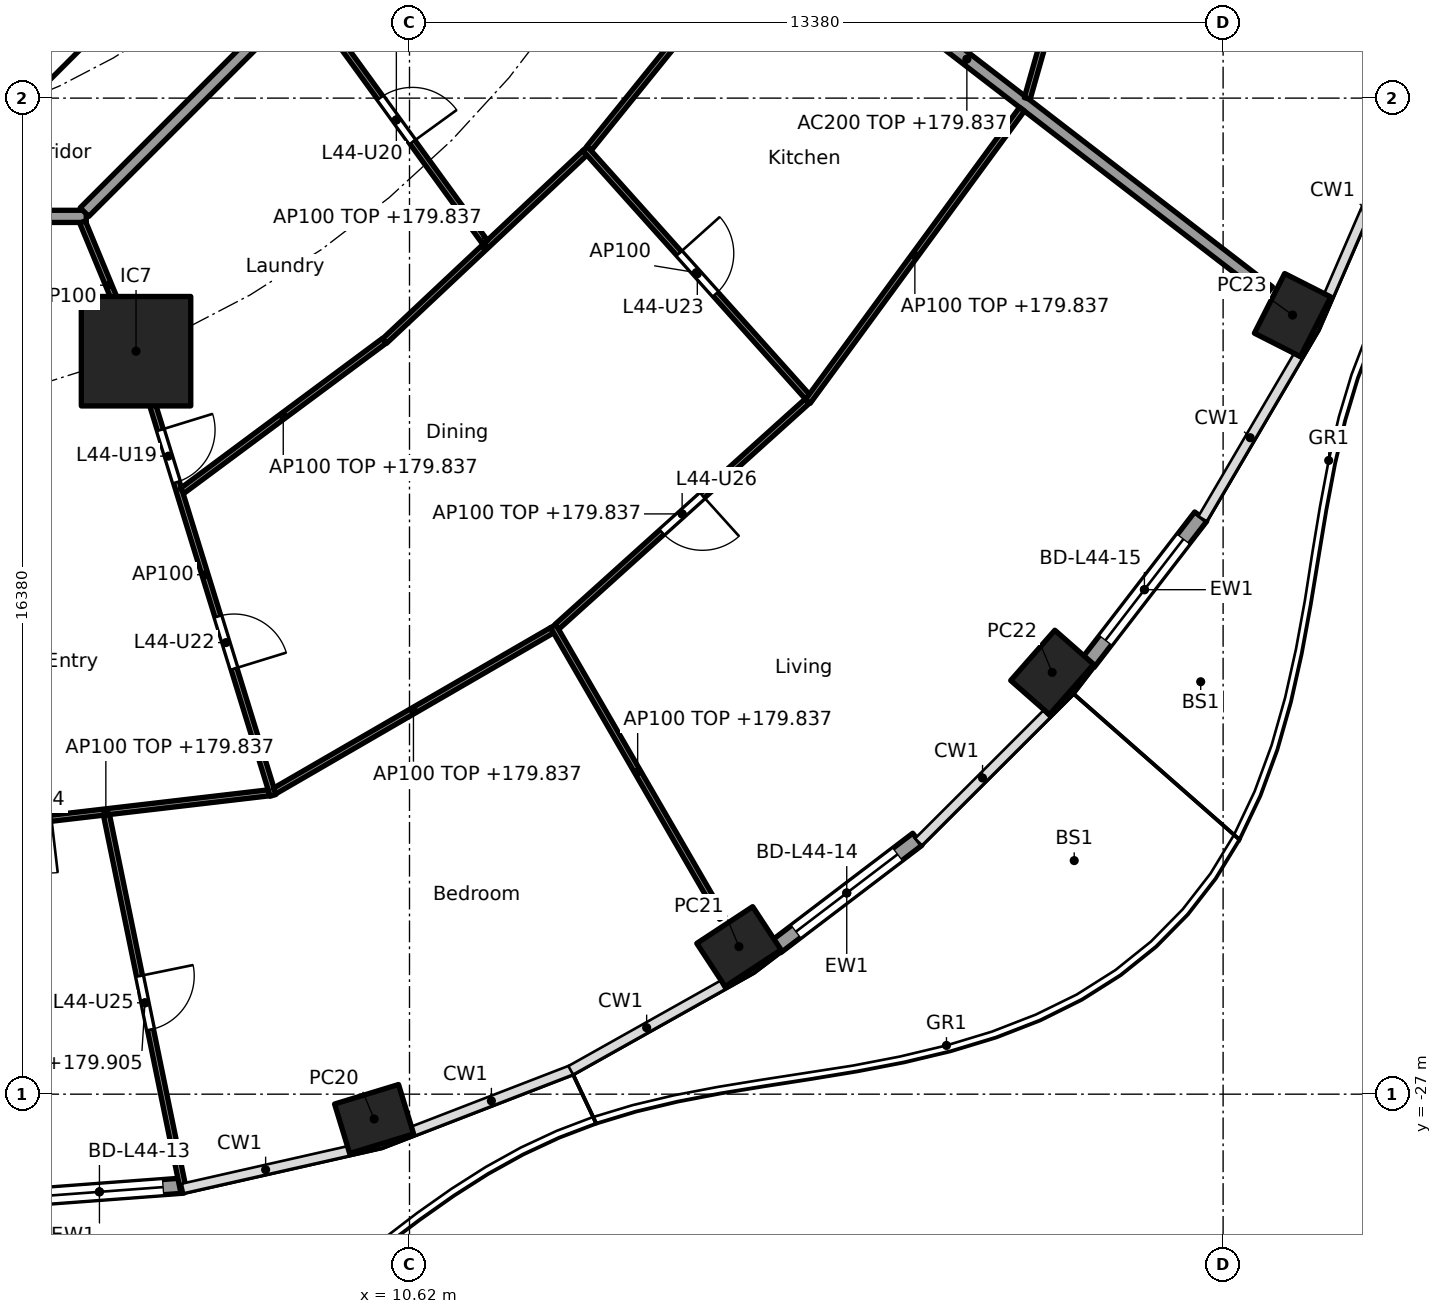
"""IFC4 building model, lengths in metres.
Left out: names, types, materials, properties, quantities, classifications, styles, units other than length and angle.
Written with IfcOpenShell. Run it as: python <this file> out.ifc"""

import sys

from ifc_helpers import new_model, si_unit, direction, frame, frame_2d, origin, origin_2d, place, context, subcontext, project, spatial, polyline, rectangle, hollow_rectangle, outline, extrude, element, fill, save


model = new_model("IFC4")
c1 = context("Model", 3, precision=1e-05, world=origin(), true_north=direction((0.0, 1.0)))
c2 = subcontext(c1, "Body", "Model", "MODEL_VIEW")
j1 = project(units=[si_unit("LENGTHUNIT", "METRE"), si_unit("PLANEANGLEUNIT", "RADIAN")], contexts=[c1])
p1 = place(None, origin())
s1 = spatial("IfcSite", under=j1, at=p1, CompositionType="ELEMENT")
p2 = place(p1, origin())
s2 = spatial("IfcBuilding", under=s1, at=p2, CompositionType="ELEMENT")
p3 = place(p2, frame((0.0, 0.0, 177.0)))
s3 = spatial("IfcBuildingStorey", under=s2, at=p3, CompositionType="ELEMENT", Elevation=177.0)
for number, where, z_axis, x_axis in (
    (1, (10.038, -27.408, 0.0), (0.0, 0.0, 1.0), (0.957, 0.292, 0.0)),
    (2, (16.038, -24.573, 0.0), (0.0, 0.0, 1.0), (0.836, 0.549, 0.0)),
    (3, (21.189, -20.064, 0.0), (0.0, 0.0, 1.0), (0.66, 0.751, 0.0)),
    (4, (25.142, -14.188, 0.0), (0.0, 0.0, 1.0), (0.452, 0.892, 0.0)),
):
    element("IfcColumn", number, at=place(p3, frame(where, z_axis=z_axis, x_axis=x_axis)), inside=s3, PredefinedType="COLUMN", context=c2, shape_type="SweptSolid", body=[
        extrude(hollow_rectangle(XDim=1.1, YDim=0.85, WallThickness=0.036, at=origin_2d()), origin(), (0.0, 0.0, 1.0), 3.7),
    ])
p4 = place(p3, frame((6.123, -14.782, 0.0), z_axis=(0.0, 0.0, 1.0), x_axis=(1.0, 0.0, 0.0)))
e5 = element("IfcColumn", 5, at=p4, inside=s3, PredefinedType="COLUMN", context=c2, shape_type="SweptSolid", body=[
    extrude(rectangle(XDim=1.8, YDim=1.8, at=origin_2d()), origin(), (0.0, 0.0, 1.0), 3.7),
])
p5 = place(p3, frame((6.903, -28.503, 0.0), z_axis=(0.0, 0.0, 1.0), x_axis=(-0.997232064422, -0.074351931305, 0.0)))
e6 = element("IfcWall", 6, at=p5, inside=s3, PredefinedType="SOLIDWALL", context=c2, shape_type="SweptSolid", body=[
    extrude(rectangle(XDim=2.771, YDim=0.25, at=frame_2d((1.386, 0.0))), origin(), (0.0, 0.0, 1.0), 3.44),
])
p6 = place(p5, frame((0.336, 0.0, 0.0)))
e7 = element("IfcOpeningElement", 7, at=p6, cuts=e6, PredefinedType="OPENING", context=c2, shape_type="SweptSolid", body=[
    extrude(rectangle(XDim=2.1, YDim=2.4, at=frame_2d((1.05, 1.2))), frame((0.0, 0.135, 0.0), z_axis=(0.0, -1.0, 0.0), x_axis=(1.0, 0.0, 0.0)), (0.0, 0.0, 1.0), 0.27),
])
p7 = place(p3, frame((18.972, -22.809, 0.0), z_axis=(0.0, 0.0, 1.0), x_axis=(-0.796055733703, -0.60522332146, 0.0)))
e8 = element("IfcWall", 8, at=p7, inside=s3, PredefinedType="SOLIDWALL", context=c2, shape_type="SweptSolid", body=[
    extrude(rectangle(XDim=2.917, YDim=0.25, at=frame_2d((1.458, 0.0))), origin(), (0.0, 0.0, 1.0), 3.44),
])
p8 = place(p7, frame((0.408, 0.0, 0.0)))
e9 = element("IfcOpeningElement", 9, at=p8, cuts=e8, PredefinedType="OPENING", context=c2, shape_type="SweptSolid", body=[
    extrude(rectangle(XDim=2.1, YDim=2.4, at=frame_2d((1.05, 1.2))), frame((0.0, 0.135, 0.0), z_axis=(0.0, -1.0, 0.0), x_axis=(1.0, 0.0, 0.0)), (0.0, 0.0, 1.0), 0.27),
])
p9 = place(p3, frame((23.632, -17.502, 0.0), z_axis=(0.0, 0.0, 1.0), x_axis=(-0.610437428894, -0.79206448311, 0.0)))
e10 = element("IfcWall", 10, at=p9, inside=s3, PredefinedType="SOLIDWALL", context=c2, shape_type="SweptSolid", body=[
    extrude(rectangle(XDim=3.035, YDim=0.25, at=frame_2d((1.518, 0.0))), origin(), (0.0, 0.0, 1.0), 3.44),
])
p10 = place(p9, frame((0.468, 0.0, 0.0)))
e11 = element("IfcOpeningElement", 11, at=p10, cuts=e10, PredefinedType="OPENING", context=c2, shape_type="SweptSolid", body=[
    extrude(rectangle(XDim=2.1, YDim=2.4, at=frame_2d((1.05, 1.2))), frame((0.0, 0.135, 0.0), z_axis=(0.0, -1.0, 0.0), x_axis=(1.0, 0.0, 0.0)), (0.0, 0.0, 1.0), 0.27),
])
p11 = place(p3, frame((4.613, -9.988, 0.0), z_axis=(0.0, 0.0, 1.0), x_axis=(0.707106781187, 0.707106781187, 0.0)))
e12 = element("IfcWall", 12, at=p11, inside=s3, PredefinedType="SHEAR", context=c2, shape_type="SweptSolid", body=[
    extrude(rectangle(XDim=7.602, YDim=0.6, at=frame_2d((3.801, 0.0))), origin(), (0.0, 0.0, 1.0), 3.44),
])
p12 = place(p11, frame((3.201, 0.0, 0.0)))
e13 = element("IfcOpeningElement", 13, at=p12, cuts=e12, PredefinedType="OPENING", context=c2, shape_type="SweptSolid", body=[
    extrude(rectangle(XDim=1.2, YDim=2.1, at=frame_2d((0.6, 1.05))), frame((0.0, 0.31, 0.0), z_axis=(0.0, -1.0, 0.0), x_axis=(1.0, 0.0, 0.0)), (0.0, 0.0, 1.0), 0.62),
])
p13 = place(p3, origin())
e14 = element("IfcWall", 14, at=p13, inside=s3, PredefinedType="SHEAR", context=c2, shape_type="SweptSolid", body=[
    extrude(outline(polyline([(-4.152, -10.025), (4.152, -10.025), (4.401, -9.776), (4.825, -10.2), (4.401, -10.625), (-4.401, -10.625), (-4.825, -10.2), (-4.401, -9.776), (-4.152, -10.025)])), origin(), (0.0, 0.0, 1.0), 3.44),
])
p14 = place(p3, frame((14.822, -6.154, 0.0), z_axis=(0.0, 0.0, 1.0), x_axis=(0.792203056092, -0.610257583254, 0.0)))
e15 = element("IfcWall", 15, at=p14, inside=s3, PredefinedType="PARTITIONING", context=c2, shape_type="SweptSolid", body=[
    extrude(rectangle(XDim=12.533, YDim=0.2, at=frame_2d((6.266, 0.0))), origin(), (0.0, 0.0, 1.0), 2.837),
])
p15 = place(p3, frame((-5.104, -12.565, 0.0), z_axis=(0.0, 0.0, 1.0), x_axis=(1.0, 0.0, 0.0)))
e16 = element("IfcWall", 16, at=p15, inside=s3, PredefinedType="PARTITIONING", context=c2, shape_type="SweptSolid", body=[
    extrude(rectangle(XDim=10.409, YDim=0.2, at=frame_2d((5.205, 0.0))), origin(), (0.0, 0.0, 1.0), 3.44),
])
p16 = place(p15, frame((8.074, 0.0, 0.0)))
e17 = element("IfcOpeningElement", 17, at=p16, cuts=e16, PredefinedType="OPENING", context=c2, shape_type="SweptSolid", body=[
    extrude(rectangle(XDim=1.0, YDim=2.1, at=frame_2d((0.5, 1.05))), frame((0.0, 0.11, 0.0), z_axis=(0.0, -1.0, 0.0), x_axis=(1.0, 0.0, 0.0)), (0.0, 0.0, 1.0), 0.22),
])
p17 = place(p3, frame((5.275, -12.494, 0.0), z_axis=(0.0, 0.0, 1.0), x_axis=(0.707106781187, 0.707106781187, 0.0)))
e18 = element("IfcWall", 18, at=p17, inside=s3, PredefinedType="PARTITIONING", context=c2, shape_type="SweptSolid", body=[
    extrude(rectangle(XDim=10.409, YDim=0.2, at=frame_2d((5.205, 0.0))), origin(), (0.0, 0.0, 1.0), 3.44),
])
p18 = place(p3, frame((2.941, -22.671, 0.0), z_axis=(0.0, 0.0, 1.0), x_axis=(0.993245806382, 0.1160291692, 0.0)))
e19 = element("IfcWall", 19, at=p18, inside=s3, PredefinedType="PARTITIONING", context=c2, shape_type="SweptSolid", body=[
    extrude(rectangle(XDim=5.408, YDim=0.1, at=frame_2d((2.704, 0.0))), origin(), (0.0, 0.0, 1.0), 2.837),
])
p19 = place(p18, frame((0.902, 0.0, 0.0)))
e20 = element("IfcOpeningElement", 20, at=p19, cuts=e19, PredefinedType="OPENING", context=c2, shape_type="SweptSolid", body=[
    extrude(rectangle(XDim=0.9, YDim=2.1, at=frame_2d((0.45, 1.05))), frame((0.0, 0.06, 0.0), z_axis=(0.0, -1.0, 0.0), x_axis=(1.0, 0.0, 0.0)), (0.0, 0.0, 1.0), 0.12),
])
p20 = place(p3, frame((5.636, -22.407, 0.0), z_axis=(0.0, 0.0, 1.0), x_axis=(0.200860375092, -0.979619880218, 0.0)))
e21 = element("IfcWall", 21, at=p20, inside=s3, PredefinedType="PARTITIONING", context=c2, shape_type="SweptSolid", body=[
    extrude(rectangle(XDim=6.311, YDim=0.1, at=frame_2d((3.155, 0.0))), origin(), (0.0, 0.0, 1.0), 2.905),
])
p21 = place(p20, frame((2.705, 0.0, 0.0)))
e22 = element("IfcOpeningElement", 22, at=p21, cuts=e21, PredefinedType="OPENING", context=c2, shape_type="SweptSolid", body=[
    extrude(rectangle(XDim=0.9, YDim=2.1, at=frame_2d((0.45, 1.05))), frame((0.0, 0.06, 0.0), z_axis=(0.0, -1.0, 0.0), x_axis=(1.0, 0.0, 0.0)), (0.0, 0.0, 1.0), 0.12),
])
p22 = place(p3, frame((5.243, -12.657, 0.0), z_axis=(0.0, 0.0, 1.0), x_axis=(0.382719158442, -0.923864733477, 0.0)))
e23 = element("IfcWall", 23, at=p22, inside=s3, PredefinedType="PARTITIONING", context=c2, shape_type="SweptSolid", body=[
    extrude(rectangle(XDim=2.25, YDim=0.1, at=frame_2d((1.125, 0.0))), origin(), (0.0, 0.0, 1.0), 3.44),
])
p23 = place(p3, frame((6.138, -14.83, 0.0), z_axis=(0.0, 0.0, 1.0), x_axis=(0.294822274121, -0.955552105687, 0.0)))
e24 = element("IfcWall", 24, at=p23, inside=s3, PredefinedType="PARTITIONING", context=c2, shape_type="SweptSolid", body=[
    extrude(rectangle(XDim=7.594, YDim=0.1, at=frame_2d((3.797, 0.0))), origin(), (0.0, 0.0, 1.0), 3.44),
])
p24 = place(p23, frame((1.306, 0.0, 0.0)))
e25 = element("IfcOpeningElement", 25, at=p24, cuts=e24, PredefinedType="OPENING", context=c2, shape_type="SweptSolid", body=[
    extrude(rectangle(XDim=0.9, YDim=2.1, at=frame_2d((0.45, 1.05))), frame((0.0, 0.06, 0.0), z_axis=(0.0, -1.0, 0.0), x_axis=(1.0, 0.0, 0.0)), (0.0, 0.0, 1.0), 0.12),
])
p25 = place(p23, frame((4.515, 0.0, 0.0)))
e26 = element("IfcOpeningElement", 26, at=p25, cuts=e24, PredefinedType="OPENING", context=c2, shape_type="SweptSolid", body=[
    extrude(rectangle(XDim=0.9, YDim=2.1, at=frame_2d((0.45, 1.05))), frame((0.0, 0.06, 0.0), z_axis=(0.0, -1.0, 0.0), x_axis=(1.0, 0.0, 0.0)), (0.0, 0.0, 1.0), 0.12),
])
p26 = place(p3, frame((6.881, -17.08, 0.0), z_axis=(0.0, 0.0, 1.0), x_axis=(0.802784956441, 0.596268659005, 0.0)))
e27 = element("IfcWall", 27, at=p26, inside=s3, PredefinedType="PARTITIONING", context=c2, shape_type="SweptSolid", body=[
    extrude(rectangle(XDim=4.142, YDim=0.1, at=frame_2d((2.071, 0.0))), origin(), (0.0, 0.0, 1.0), 2.837),
])
p27 = place(p3, frame((8.405, -22.013, 0.0), z_axis=(0.0, 0.0, 1.0), x_axis=(0.865277177388, 0.501293732547, 0.0)))
e28 = element("IfcWall", 28, at=p27, inside=s3, PredefinedType="PARTITIONING", context=c2, shape_type="SweptSolid", body=[
    extrude(rectangle(XDim=5.27, YDim=0.1, at=frame_2d((2.635, 0.0))), origin(), (0.0, 0.0, 1.0), 2.837),
])
p28 = place(p3, frame((10.21, -14.614, 0.0), z_axis=(0.0, 0.0, 1.0), x_axis=(0.728883199496, 0.684638066055, 0.0)))
e29 = element("IfcWall", 29, at=p28, inside=s3, PredefinedType="PARTITIONING", context=c2, shape_type="SweptSolid", body=[
    extrude(rectangle(XDim=4.519, YDim=0.1, at=frame_2d((2.26, 0.0))), origin(), (0.0, 0.0, 1.0), 2.837),
])
p29 = place(p3, frame((12.983, -19.303, 0.0), z_axis=(0.0, 0.0, 1.0), x_axis=(0.501315846071, -0.865264365659, 0.0)))
e30 = element("IfcWall", 30, at=p29, inside=s3, PredefinedType="PARTITIONING", context=c2, shape_type="SweptSolid", body=[
    extrude(rectangle(XDim=5.542, YDim=0.1, at=frame_2d((2.771, 0.0))), origin(), (0.0, 0.0, 1.0), 2.837),
])
p30 = place(p3, frame((13.045, -19.313, 0.0), z_axis=(0.0, 0.0, 1.0), x_axis=(0.742790086539, 0.66952437397, 0.0)))
e31 = element("IfcWall", 31, at=p30, inside=s3, PredefinedType="PARTITIONING", context=c2, shape_type="SweptSolid", body=[
    extrude(rectangle(XDim=5.542, YDim=0.1, at=frame_2d((2.771, 0.0))), origin(), (0.0, 0.0, 1.0), 2.837),
])
p31 = place(p30, frame((2.321, 0.0, 0.0)))
e32 = element("IfcOpeningElement", 32, at=p31, cuts=e31, PredefinedType="OPENING", context=c2, shape_type="SweptSolid", body=[
    extrude(rectangle(XDim=0.9, YDim=2.1, at=frame_2d((0.45, 1.05))), frame((0.0, 0.06, 0.0), z_axis=(0.0, -1.0, 0.0), x_axis=(1.0, 0.0, 0.0)), (0.0, 0.0, 1.0), 0.12),
])
p32 = place(p3, frame((8.943, -8.966, 0.0), z_axis=(0.0, 0.0, 1.0), x_axis=(0.587187896734, -0.809450661825, 0.0)))
e33 = element("IfcWall", 33, at=p32, inside=s3, PredefinedType="PARTITIONING", context=c2, shape_type="SweptSolid", body=[
    extrude(rectangle(XDim=4.975, YDim=0.1, at=frame_2d((2.487, 0.0))), origin(), (0.0, 0.0, 1.0), 2.756),
])
p33 = place(p32, frame((2.037, 0.0, 0.0)))
e34 = element("IfcOpeningElement", 34, at=p33, cuts=e33, PredefinedType="OPENING", context=c2, shape_type="SweptSolid", body=[
    extrude(rectangle(XDim=0.9, YDim=2.1, at=frame_2d((0.45, 1.05))), frame((0.0, 0.06, 0.0), z_axis=(0.0, -1.0, 0.0), x_axis=(1.0, 0.0, 0.0)), (0.0, 0.0, 1.0), 0.12),
])
p34 = place(p3, frame((13.507, -11.449, 0.0), z_axis=(0.0, 0.0, 1.0), x_axis=(0.667299792168, -0.744789223453, 0.0)))
e35 = element("IfcWall", 35, at=p34, inside=s3, PredefinedType="PARTITIONING", context=c2, shape_type="SweptSolid", body=[
    extrude(rectangle(XDim=5.482, YDim=0.1, at=frame_2d((2.741, 0.0))), origin(), (0.0, 0.0, 1.0), 3.44),
])
p35 = place(p34, frame((2.316, 0.0, 0.0)))
e36 = element("IfcOpeningElement", 36, at=p35, cuts=e35, PredefinedType="OPENING", context=c2, shape_type="SweptSolid", body=[
    extrude(rectangle(XDim=0.9, YDim=2.1, at=frame_2d((0.45, 1.05))), frame((0.0, 0.06, 0.0), z_axis=(0.0, -1.0, 0.0), x_axis=(1.0, 0.0, 0.0)), (0.0, 0.0, 1.0), 0.12),
])
p36 = place(p3, frame((13.572, -11.447, 0.0), z_axis=(0.0, 0.0, 1.0), x_axis=(0.628738316533, 0.777616955399, 0.0)))
e37 = element("IfcWall", 37, at=p36, inside=s3, PredefinedType="PARTITIONING", context=c2, shape_type="SweptSolid", body=[
    extrude(rectangle(XDim=4.857, YDim=0.1, at=frame_2d((2.429, 0.0))), origin(), (0.0, 0.0, 1.0), 2.837),
])
p37 = place(p3, frame((17.169, -15.609, 0.0), z_axis=(0.0, 0.0, 1.0), x_axis=(0.591122127251, 0.806582066918, 0.0)))
e38 = element("IfcWall", 38, at=p37, inside=s3, PredefinedType="PARTITIONING", context=c2, shape_type="SweptSolid", body=[
    extrude(rectangle(XDim=5.96, YDim=0.1, at=frame_2d((2.98, 0.0))), origin(), (0.0, 0.0, 1.0), 2.837),
])
p38 = place(p3, frame((20.779, -10.625, 0.0), z_axis=(0.0, 0.0, 1.0), x_axis=(0.273819702124, 0.961781040949, 0.0)))
e39 = element("IfcWall", 39, at=p38, inside=s3, PredefinedType="PARTITIONING", context=c2, shape_type="SweptSolid", body=[
    extrude(rectangle(XDim=5.152, YDim=0.1, at=frame_2d((2.576, 0.0))), origin(), (0.0, 0.0, 1.0), 2.837),
])
p39 = place(p38, frame((2.126, 0.0, 0.0)))
e40 = element("IfcOpeningElement", 40, at=p39, cuts=e39, PredefinedType="OPENING", context=c2, shape_type="SweptSolid", body=[
    extrude(rectangle(XDim=0.9, YDim=2.1, at=frame_2d((0.45, 1.05))), frame((0.0, 0.06, 0.0), z_axis=(0.0, -1.0, 0.0), x_axis=(1.0, 0.0, 0.0)), (0.0, 0.0, 1.0), 0.12),
])
p40 = place(p6, origin())
e41 = element("IfcDoor", 41, at=p40, inside=s3, OperationType="SLIDING_TO_LEFT", PredefinedType="DOOR", context=c2, shape_type="SweptSolid", body=[
    extrude(rectangle(XDim=2.1, YDim=2.4, at=frame_2d((1.05, 1.2))), frame((0.0, 0.025, 0.0), z_axis=(0.0, -1.0, 0.0), x_axis=(1.0, 0.0, 0.0)), (0.0, 0.0, 1.0), 0.05),
])
fill(e7, e41)
p41 = place(p8, origin())
e42 = element("IfcDoor", 42, at=p41, inside=s3, OperationType="SLIDING_TO_LEFT", PredefinedType="DOOR", context=c2, shape_type="SweptSolid", body=[
    extrude(rectangle(XDim=2.1, YDim=2.4, at=frame_2d((1.05, 1.2))), frame((0.0, 0.025, 0.0), z_axis=(0.0, -1.0, 0.0), x_axis=(1.0, 0.0, 0.0)), (0.0, 0.0, 1.0), 0.05),
])
fill(e9, e42)
p42 = place(p10, origin())
e43 = element("IfcDoor", 43, at=p42, inside=s3, OperationType="SLIDING_TO_LEFT", PredefinedType="DOOR", context=c2, shape_type="SweptSolid", body=[
    extrude(rectangle(XDim=2.1, YDim=2.4, at=frame_2d((1.05, 1.2))), frame((0.0, 0.025, 0.0), z_axis=(0.0, -1.0, 0.0), x_axis=(1.0, 0.0, 0.0)), (0.0, 0.0, 1.0), 0.05),
])
fill(e11, e43)
p43 = place(p24, origin())
e44 = element("IfcDoor", 44, at=p43, inside=s3, OperationType="SINGLE_SWING_LEFT", PredefinedType="DOOR", context=c2, shape_type="SweptSolid", body=[
    extrude(rectangle(XDim=0.9, YDim=2.1, at=frame_2d((0.45, 1.05))), frame((0.0, 0.025, 0.0), z_axis=(0.0, -1.0, 0.0), x_axis=(1.0, 0.0, 0.0)), (0.0, 0.0, 1.0), 0.05),
])
fill(e25, e44)
p44 = place(p33, origin())
e45 = element("IfcDoor", 45, at=p44, inside=s3, OperationType="SINGLE_SWING_RIGHT", PredefinedType="DOOR", context=c2, shape_type="SweptSolid", body=[
    extrude(rectangle(XDim=0.9, YDim=2.1, at=frame_2d((0.45, 1.05))), frame((0.0, 0.025, 0.0), z_axis=(0.0, -1.0, 0.0), x_axis=(1.0, 0.0, 0.0)), (0.0, 0.0, 1.0), 0.05),
])
fill(e34, e45)
p45 = place(p25, origin())
e46 = element("IfcDoor", 46, at=p45, inside=s3, OperationType="SINGLE_SWING_RIGHT", PredefinedType="DOOR", context=c2, shape_type="SweptSolid", body=[
    extrude(rectangle(XDim=0.9, YDim=2.1, at=frame_2d((0.45, 1.05))), frame((0.0, 0.025, 0.0), z_axis=(0.0, -1.0, 0.0), x_axis=(1.0, 0.0, 0.0)), (0.0, 0.0, 1.0), 0.05),
])
fill(e26, e46)
p46 = place(p35, origin())
e47 = element("IfcDoor", 47, at=p46, inside=s3, OperationType="SINGLE_SWING_LEFT", PredefinedType="DOOR", context=c2, shape_type="SweptSolid", body=[
    extrude(rectangle(XDim=0.9, YDim=2.1, at=frame_2d((0.45, 1.05))), frame((0.0, 0.025, 0.0), z_axis=(0.0, -1.0, 0.0), x_axis=(1.0, 0.0, 0.0)), (0.0, 0.0, 1.0), 0.05),
])
fill(e36, e47)
p47 = place(p21, origin())
e48 = element("IfcDoor", 48, at=p47, inside=s3, OperationType="SINGLE_SWING_LEFT", PredefinedType="DOOR", context=c2, shape_type="SweptSolid", body=[
    extrude(rectangle(XDim=0.9, YDim=2.1, at=frame_2d((0.45, 1.05))), frame((0.0, 0.025, 0.0), z_axis=(0.0, -1.0, 0.0), x_axis=(1.0, 0.0, 0.0)), (0.0, 0.0, 1.0), 0.05),
])
fill(e22, e48)
p48 = place(p31, frame((0.9, 0.0, 0.0), x_axis=(-1.0, 0.0, 0.0)))
e49 = element("IfcDoor", 49, at=p48, inside=s3, OperationType="SINGLE_SWING_LEFT", PredefinedType="DOOR", context=c2, shape_type="SweptSolid", body=[
    extrude(rectangle(XDim=0.9, YDim=2.1, at=frame_2d((0.45, 1.05))), frame((0.0, 0.025, 0.0), z_axis=(0.0, -1.0, 0.0), x_axis=(1.0, 0.0, 0.0)), (0.0, 0.0, 1.0), 0.05),
])
fill(e32, e49)
save(model, sys.argv[1])
